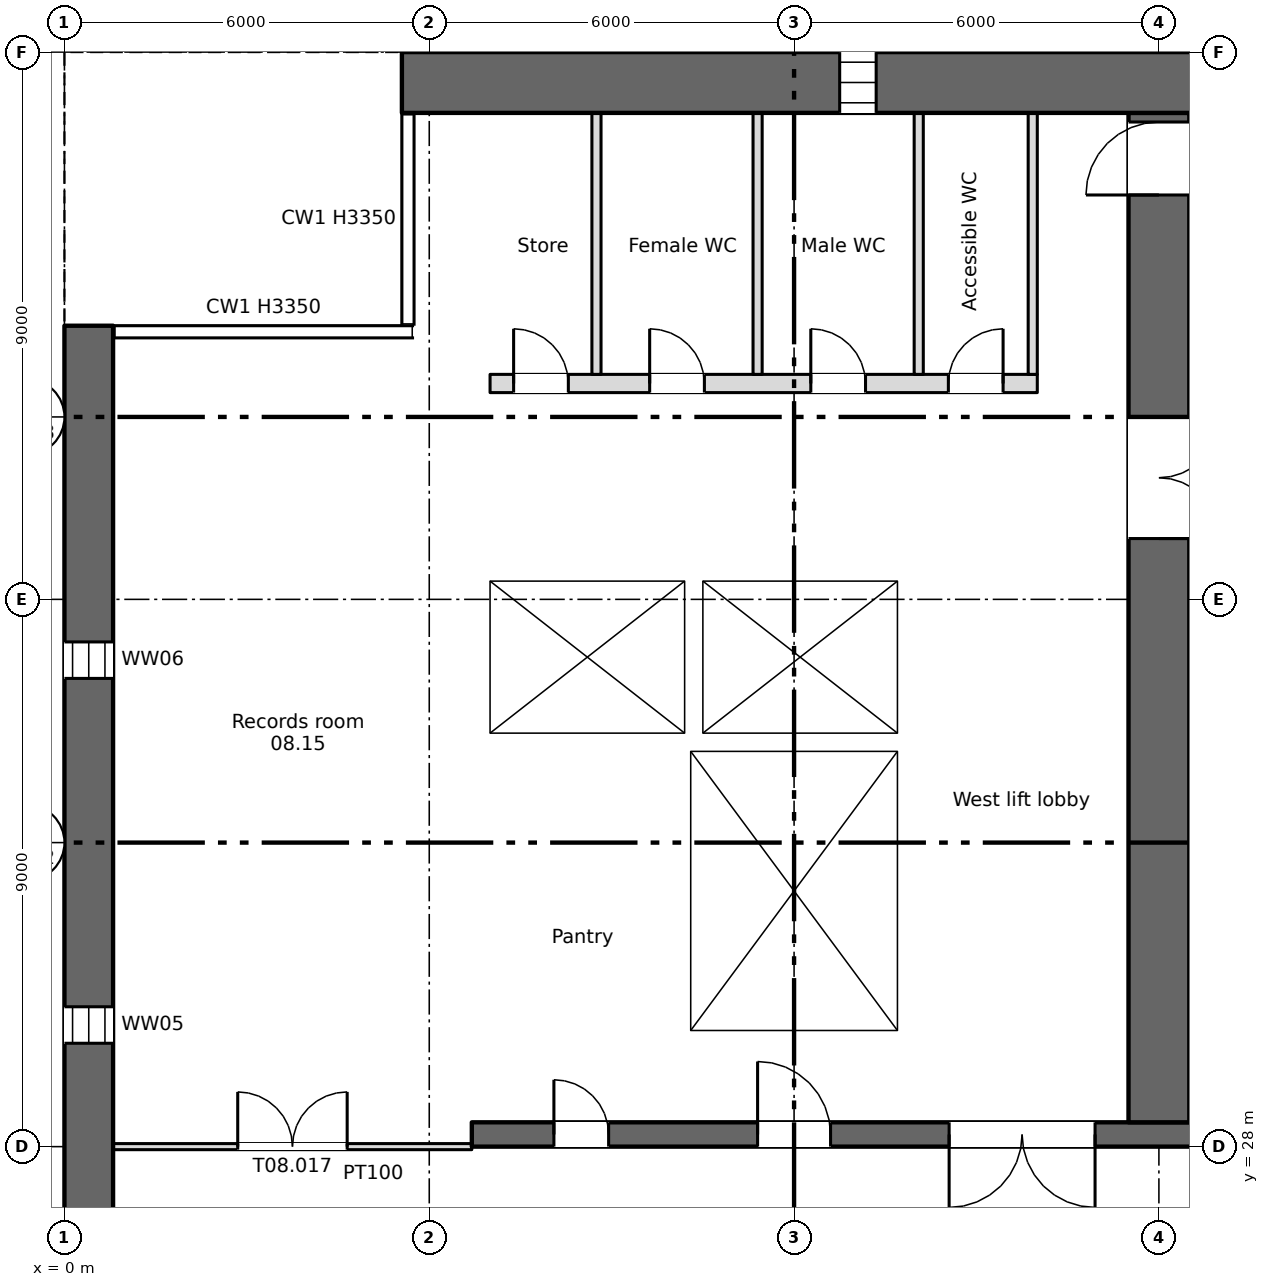
"""IFC4 building model, lengths in metres.
Left out: names, types, materials, properties, quantities, classifications, styles, units other than length and angle.
Written with IfcOpenShell. Run it as: python <this file> out.ifc"""

import sys

from ifc_helpers import new_model, si_unit, direction, frame, frame_2d, origin, place, context, subcontext, project, spatial, rectangle, extrude, element, fill, save


model = new_model("IFC4")
c1 = context("Model", 3, precision=1e-05, world=origin(), true_north=direction((0.0, 1.0)))
c2 = subcontext(c1, "Body", "Model", "MODEL_VIEW")
j1 = project(units=[si_unit("LENGTHUNIT", "METRE"), si_unit("PLANEANGLEUNIT", "RADIAN")], contexts=[c1])
p1 = place(None, origin())
s1 = spatial("IfcSite", under=j1, at=p1, CompositionType="ELEMENT")
p2 = place(p1, origin())
s2 = spatial("IfcBuilding", under=s1, at=p2, CompositionType="ELEMENT")
p3 = place(p2, frame((0.0, 0.0, 30.0)))
s3 = spatial("IfcBuildingStorey", under=s2, at=p3, CompositionType="ELEMENT", Elevation=30.0)
p4 = place(p3, frame((0.4, 4.5, 0.0), z_axis=(0.0, 0.0, 1.0), x_axis=(0.0, 1.0, 0.0)))
e1 = element("IfcWall", 1, at=p4, inside=s3, PredefinedType="SHEAR", context=c2, shape_type="SweptSolid", body=[
    extrude(rectangle(XDim=37.0, YDim=0.8, at=frame_2d((18.5, 0.0))), origin(), (0.0, 0.0, 1.0), 3.35),
])
p5 = place(p4, frame((1.2, 0.0, 0.6)))
e2 = element("IfcOpeningElement", 2, at=p5, cuts=e1, PredefinedType="OPENING", context=c2, shape_type="SweptSolid", body=[
    extrude(rectangle(XDim=0.6, YDim=2.4, at=frame_2d((0.3, 1.2))), frame((0.0, 0.41, 0.0), z_axis=(0.0, -1.0, 0.0), x_axis=(1.0, 0.0, 0.0)), (0.0, 0.0, 1.0), 0.82),
])
p6 = place(p4, frame((7.2, 0.0, 0.6)))
e3 = element("IfcOpeningElement", 3, at=p6, cuts=e1, PredefinedType="OPENING", context=c2, shape_type="SweptSolid", body=[
    extrude(rectangle(XDim=0.6, YDim=2.4, at=frame_2d((0.3, 1.2))), frame((0.0, 0.41, 0.0), z_axis=(0.0, -1.0, 0.0), x_axis=(1.0, 0.0, 0.0)), (0.0, 0.0, 1.0), 0.82),
])
p7 = place(p4, frame((13.2, 0.0, 0.6)))
e4 = element("IfcOpeningElement", 4, at=p7, cuts=e1, PredefinedType="OPENING", context=c2, shape_type="SweptSolid", body=[
    extrude(rectangle(XDim=0.6, YDim=2.4, at=frame_2d((0.3, 1.2))), frame((0.0, 0.41, 0.0), z_axis=(0.0, -1.0, 0.0), x_axis=(1.0, 0.0, 0.0)), (0.0, 0.0, 1.0), 0.82),
])
p8 = place(p4, frame((19.2, 0.0, 0.6)))
e5 = element("IfcOpeningElement", 5, at=p8, cuts=e1, PredefinedType="OPENING", context=c2, shape_type="SweptSolid", body=[
    extrude(rectangle(XDim=0.6, YDim=2.4, at=frame_2d((0.3, 1.2))), frame((0.0, 0.41, 0.0), z_axis=(0.0, -1.0, 0.0), x_axis=(1.0, 0.0, 0.0)), (0.0, 0.0, 1.0), 0.82),
])
p9 = place(p4, frame((25.2, 0.0, 0.6)))
e6 = element("IfcOpeningElement", 6, at=p9, cuts=e1, PredefinedType="OPENING", context=c2, shape_type="SweptSolid", body=[
    extrude(rectangle(XDim=0.6, YDim=2.4, at=frame_2d((0.3, 1.2))), frame((0.0, 0.41, 0.0), z_axis=(0.0, -1.0, 0.0), x_axis=(1.0, 0.0, 0.0)), (0.0, 0.0, 1.0), 0.82),
])
p10 = place(p4, frame((31.2, 0.0, 0.6)))
e7 = element("IfcOpeningElement", 7, at=p10, cuts=e1, PredefinedType="OPENING", context=c2, shape_type="SweptSolid", body=[
    extrude(rectangle(XDim=0.6, YDim=2.4, at=frame_2d((0.3, 1.2))), frame((0.0, 0.41, 0.0), z_axis=(0.0, -1.0, 0.0), x_axis=(1.0, 0.0, 0.0)), (0.0, 0.0, 1.0), 0.82),
])
p11 = place(p3, frame((5.55, 45.5, 0.0), z_axis=(0.0, 0.0, 1.0), x_axis=(1.0, 0.0, 0.0)))
e8 = element("IfcWall", 8, at=p11, inside=s3, PredefinedType="SHEAR", context=c2, shape_type="SweptSolid", body=[
    extrude(rectangle(XDim=66.9, YDim=1.0, at=frame_2d((33.45, 0.0))), origin(), (0.0, 0.0, 1.0), 3.35),
])
p12 = place(p11, frame((7.2, 0.0, 0.6)))
e9 = element("IfcOpeningElement", 9, at=p12, cuts=e8, PredefinedType="OPENING", context=c2, shape_type="SweptSolid", body=[
    extrude(rectangle(XDim=0.6, YDim=2.4, at=frame_2d((0.3, 1.2))), frame((0.0, 0.51, 0.0), z_axis=(0.0, -1.0, 0.0), x_axis=(1.0, 0.0, 0.0)), (0.0, 0.0, 1.0), 1.02),
])
p13 = place(p11, frame((61.2, 0.0, 0.6)))
e10 = element("IfcOpeningElement", 10, at=p13, cuts=e8, PredefinedType="OPENING", context=c2, shape_type="SweptSolid", body=[
    extrude(rectangle(XDim=0.6, YDim=2.4, at=frame_2d((0.3, 1.2))), frame((0.0, 0.51, 0.0), z_axis=(0.0, -1.0, 0.0), x_axis=(1.0, 0.0, 0.0)), (0.0, 0.0, 1.0), 1.02),
])
p14 = place(p3, frame((6.7, 28.2, 0.0), z_axis=(0.0, 0.0, 1.0), x_axis=(1.0, 0.0, 0.0)))
e11 = element("IfcWall", 11, at=p14, inside=s3, PredefinedType="SHEAR", context=c2, shape_type="SweptSolid", body=[
    extrude(rectangle(XDim=57.8, YDim=0.4, at=frame_2d((28.9, 0.0))), origin(), (0.0, 0.0, 1.0), 3.35),
])
p15 = place(p14, frame((12.062, 0.0, 0.0)))
e12 = element("IfcOpeningElement", 12, at=p15, cuts=e11, PredefinedType="OPENING", context=c2, shape_type="SweptSolid", body=[
    extrude(rectangle(XDim=0.9, YDim=2.1, at=frame_2d((0.45, 1.05))), frame((0.0, 0.21, 0.0), z_axis=(0.0, -1.0, 0.0), x_axis=(1.0, 0.0, 0.0)), (0.0, 0.0, 1.0), 0.42),
])
p16 = place(p14, frame((14.637, 0.0, 0.0)))
e13 = element("IfcOpeningElement", 13, at=p16, cuts=e11, PredefinedType="OPENING", context=c2, shape_type="SweptSolid", body=[
    extrude(rectangle(XDim=0.9, YDim=2.1, at=frame_2d((0.45, 1.05))), frame((0.0, 0.21, 0.0), z_axis=(0.0, -1.0, 0.0), x_axis=(1.0, 0.0, 0.0)), (0.0, 0.0, 1.0), 0.42),
])
p17 = place(p14, frame((49.062, 0.0, 0.0)))
e14 = element("IfcOpeningElement", 14, at=p17, cuts=e11, PredefinedType="OPENING", context=c2, shape_type="SweptSolid", body=[
    extrude(rectangle(XDim=0.9, YDim=2.1, at=frame_2d((0.45, 1.05))), frame((0.0, 0.21, 0.0), z_axis=(0.0, -1.0, 0.0), x_axis=(1.0, 0.0, 0.0)), (0.0, 0.0, 1.0), 0.42),
])
p18 = place(p14, frame((51.637, 0.0, 0.0)))
e15 = element("IfcOpeningElement", 15, at=p18, cuts=e11, PredefinedType="OPENING", context=c2, shape_type="SweptSolid", body=[
    extrude(rectangle(XDim=0.9, YDim=2.1, at=frame_2d((0.45, 1.05))), frame((0.0, 0.21, 0.0), z_axis=(0.0, -1.0, 0.0), x_axis=(1.0, 0.0, 0.0)), (0.0, 0.0, 1.0), 0.42),
])
p19 = place(p14, frame((1.35, 0.0, 0.0)))
e16 = element("IfcOpeningElement", 16, at=p19, cuts=e11, PredefinedType="OPENING", context=c2, shape_type="SweptSolid", body=[
    extrude(rectangle(XDim=0.9, YDim=2.1, at=frame_2d((0.45, 1.05))), frame((0.0, 0.21, 0.0), z_axis=(0.0, -1.0, 0.0), x_axis=(1.0, 0.0, 0.0)), (0.0, 0.0, 1.0), 0.42),
])
p20 = place(p14, frame((4.7, 0.0, 0.0)))
e17 = element("IfcOpeningElement", 17, at=p20, cuts=e11, PredefinedType="OPENING", context=c2, shape_type="SweptSolid", body=[
    extrude(rectangle(XDim=1.2, YDim=2.1, at=frame_2d((0.6, 1.05))), frame((0.0, 0.21, 0.0), z_axis=(0.0, -1.0, 0.0), x_axis=(1.0, 0.0, 0.0)), (0.0, 0.0, 1.0), 0.42),
])
p21 = place(p14, frame((31.7, 0.0, 0.0)))
e18 = element("IfcOpeningElement", 18, at=p21, cuts=e11, PredefinedType="OPENING", context=c2, shape_type="SweptSolid", body=[
    extrude(rectangle(XDim=1.2, YDim=2.1, at=frame_2d((0.6, 1.05))), frame((0.0, 0.21, 0.0), z_axis=(0.0, -1.0, 0.0), x_axis=(1.0, 0.0, 0.0)), (0.0, 0.0, 1.0), 0.42),
])
p22 = place(p14, frame((55.2, 0.0, 0.0)))
e19 = element("IfcOpeningElement", 19, at=p22, cuts=e11, PredefinedType="OPENING", context=c2, shape_type="SweptSolid", body=[
    extrude(rectangle(XDim=1.2, YDim=2.1, at=frame_2d((0.6, 1.05))), frame((0.0, 0.21, 0.0), z_axis=(0.0, -1.0, 0.0), x_axis=(1.0, 0.0, 0.0)), (0.0, 0.0, 1.0), 0.42),
])
p23 = place(p14, frame((21.7, 0.0, 0.0)))
e20 = element("IfcOpeningElement", 20, at=p23, cuts=e11, PredefinedType="OPENING", context=c2, shape_type="SweptSolid", body=[
    extrude(rectangle(XDim=1.2, YDim=2.1, at=frame_2d((0.6, 1.05))), frame((0.0, 0.21, 0.0), z_axis=(0.0, -1.0, 0.0), x_axis=(1.0, 0.0, 0.0)), (0.0, 0.0, 1.0), 0.42),
])
p24 = place(p14, frame((41.7, 0.0, 0.0)))
e21 = element("IfcOpeningElement", 21, at=p24, cuts=e11, PredefinedType="OPENING", context=c2, shape_type="SweptSolid", body=[
    extrude(rectangle(XDim=1.2, YDim=2.1, at=frame_2d((0.6, 1.05))), frame((0.0, 0.21, 0.0), z_axis=(0.0, -1.0, 0.0), x_axis=(1.0, 0.0, 0.0)), (0.0, 0.0, 1.0), 0.42),
])
p25 = place(p14, frame((24.85, 0.0, 0.0)))
e22 = element("IfcOpeningElement", 22, at=p25, cuts=e11, PredefinedType="OPENING", context=c2, shape_type="SweptSolid", body=[
    extrude(rectangle(XDim=2.4, YDim=2.1, at=frame_2d((1.2, 1.05))), frame((0.0, 0.21, 0.0), z_axis=(0.0, -1.0, 0.0), x_axis=(1.0, 0.0, 0.0)), (0.0, 0.0, 1.0), 0.42),
])
p26 = place(p14, frame((37.35, 0.0, 0.0)))
e23 = element("IfcOpeningElement", 23, at=p26, cuts=e11, PredefinedType="OPENING", context=c2, shape_type="SweptSolid", body=[
    extrude(rectangle(XDim=2.4, YDim=2.1, at=frame_2d((1.2, 1.05))), frame((0.0, 0.21, 0.0), z_axis=(0.0, -1.0, 0.0), x_axis=(1.0, 0.0, 0.0)), (0.0, 0.0, 1.0), 0.42),
])
p27 = place(p14, frame((7.85, 0.0, 0.0)))
e24 = element("IfcOpeningElement", 24, at=p27, cuts=e11, PredefinedType="OPENING", context=c2, shape_type="SweptSolid", body=[
    extrude(rectangle(XDim=2.4, YDim=2.1, at=frame_2d((1.2, 1.05))), frame((0.0, 0.21, 0.0), z_axis=(0.0, -1.0, 0.0), x_axis=(1.0, 0.0, 0.0)), (0.0, 0.0, 1.0), 0.42),
])
p28 = place(p14, frame((28.85, 0.0, 0.0)))
e25 = element("IfcOpeningElement", 25, at=p28, cuts=e11, PredefinedType="OPENING", context=c2, shape_type="SweptSolid", body=[
    extrude(rectangle(XDim=0.9, YDim=2.1, at=frame_2d((0.45, 1.05))), frame((0.0, 0.21, 0.0), z_axis=(0.0, -1.0, 0.0), x_axis=(1.0, 0.0, 0.0)), (0.0, 0.0, 1.0), 0.42),
])
p29 = place(p14, frame((34.85, 0.0, 0.0)))
e26 = element("IfcOpeningElement", 26, at=p29, cuts=e11, PredefinedType="OPENING", context=c2, shape_type="SweptSolid", body=[
    extrude(rectangle(XDim=0.9, YDim=2.1, at=frame_2d((0.45, 1.05))), frame((0.0, 0.21, 0.0), z_axis=(0.0, -1.0, 0.0), x_axis=(1.0, 0.0, 0.0)), (0.0, 0.0, 1.0), 0.42),
])
p30 = place(p3, frame((6.85, 28.4, 0.0), z_axis=(0.0, 0.0, 1.0), x_axis=(0.0, 1.0, 0.0)))
e27 = element("IfcWall", 27, at=p30, inside=s3, PredefinedType="SHEAR", context=c2, shape_type="SweptSolid", body=[
    extrude(rectangle(XDim=16.6, YDim=0.3, at=frame_2d((8.3, 0.0))), origin(), (0.0, 0.0, 1.0), 3.35),
])
p31 = place(p3, frame((18.0, 28.4, 0.0), z_axis=(0.0, 0.0, 1.0), x_axis=(0.0, 1.0, 0.0)))
e28 = element("IfcWall", 28, at=p31, inside=s3, PredefinedType="SHEAR", context=c2, shape_type="SweptSolid", body=[
    extrude(rectangle(XDim=16.6, YDim=1.0, at=frame_2d((8.3, 0.0))), origin(), (0.0, 0.0, 1.0), 3.35),
])
p32 = place(p31, frame((9.6, 0.0, 0.0)))
e29 = element("IfcOpeningElement", 29, at=p32, cuts=e28, PredefinedType="OPENING", context=c2, shape_type="SweptSolid", body=[
    extrude(rectangle(XDim=2.0, YDim=2.1, at=frame_2d((1.0, 1.05))), frame((0.0, 0.51, 0.0), z_axis=(0.0, -1.0, 0.0), x_axis=(1.0, 0.0, 0.0)), (0.0, 0.0, 1.0), 1.02),
])
p33 = place(p31, frame((15.25, 0.0, 0.0)))
e30 = element("IfcOpeningElement", 30, at=p33, cuts=e28, PredefinedType="OPENING", context=c2, shape_type="SweptSolid", body=[
    extrude(rectangle(XDim=1.2, YDim=2.1, at=frame_2d((0.6, 1.05))), frame((0.0, 0.51, 0.0), z_axis=(0.0, -1.0, 0.0), x_axis=(1.0, 0.0, 0.0)), (0.0, 0.0, 1.0), 1.02),
])
for number, where, z_axis, x_axis in (
    (31, (10.15, 28.4, 0.0), (0.0, 0.0, 1.0), (0.0, 1.0, 0.0)),
    (32, (13.85, 28.4, 0.0), (0.0, 0.0, 1.0), (0.0, 1.0, 0.0)),
):
    element("IfcWall", number, at=place(p3, frame(where, z_axis=z_axis, x_axis=x_axis)), inside=s3, PredefinedType="SHEAR", context=c2, shape_type="SweptSolid", body=[
        extrude(rectangle(XDim=6.1, YDim=0.3, at=frame_2d((3.05, 0.0))), origin(), (0.0, 0.0, 1.0), 3.35),
    ])
for number, where, z_axis, x_axis in (
    (33, (7.0, 34.65, 0.0), (0.0, 0.0, 1.0), (1.0, 0.0, 0.0)),
    (34, (7.0, 37.45, 0.0), (0.0, 0.0, 1.0), (1.0, 0.0, 0.0)),
):
    element("IfcWall", number, at=place(p3, frame(where, z_axis=z_axis, x_axis=x_axis)), inside=s3, PredefinedType="SHEAR", context=c2, shape_type="SweptSolid", body=[
        extrude(rectangle(XDim=7.0, YDim=0.3, at=frame_2d((3.5, 0.0))), origin(), (0.0, 0.0, 1.0), 3.35),
    ])
p34 = place(p3, frame((13.85, 34.8, 0.0), z_axis=(0.0, 0.0, 1.0), x_axis=(0.0, 1.0, 0.0)))
e35 = element("IfcWall", 35, at=p34, inside=s3, PredefinedType="SHEAR", context=c2, shape_type="SweptSolid", body=[
    extrude(rectangle(XDim=2.5, YDim=0.3, at=frame_2d((1.25, 0.0))), origin(), (0.0, 0.0, 1.0), 3.35),
])
p35 = place(p3, frame((7.0, 40.55, 0.0), z_axis=(0.0, 0.0, 1.0), x_axis=(1.0, 0.0, 0.0)))
e36 = element("IfcWall", 36, at=p35, inside=s3, PredefinedType="PARTITIONING", context=c2, shape_type="SweptSolid", body=[
    extrude(rectangle(XDim=9.0, YDim=0.3, at=frame_2d((4.5, 0.0))), origin(), (0.0, 0.0, 1.0), 3.35),
])
p36 = place(p35, frame((0.387, 0.0, 0.0)))
e37 = element("IfcOpeningElement", 37, at=p36, cuts=e36, PredefinedType="OPENING", context=c2, shape_type="SweptSolid", body=[
    extrude(rectangle(XDim=0.9, YDim=2.1, at=frame_2d((0.45, 1.05))), frame((0.0, 0.16, 0.0), z_axis=(0.0, -1.0, 0.0), x_axis=(1.0, 0.0, 0.0)), (0.0, 0.0, 1.0), 0.32),
])
p37 = place(p35, frame((2.625, 0.0, 0.0)))
e38 = element("IfcOpeningElement", 38, at=p37, cuts=e36, PredefinedType="OPENING", context=c2, shape_type="SweptSolid", body=[
    extrude(rectangle(XDim=0.9, YDim=2.1, at=frame_2d((0.45, 1.05))), frame((0.0, 0.16, 0.0), z_axis=(0.0, -1.0, 0.0), x_axis=(1.0, 0.0, 0.0)), (0.0, 0.0, 1.0), 0.32),
])
p38 = place(p35, frame((5.275, 0.0, 0.0)))
e39 = element("IfcOpeningElement", 39, at=p38, cuts=e36, PredefinedType="OPENING", context=c2, shape_type="SweptSolid", body=[
    extrude(rectangle(XDim=0.9, YDim=2.1, at=frame_2d((0.45, 1.05))), frame((0.0, 0.16, 0.0), z_axis=(0.0, -1.0, 0.0), x_axis=(1.0, 0.0, 0.0)), (0.0, 0.0, 1.0), 0.32),
])
p39 = place(p35, frame((7.538, 0.0, 0.0)))
e40 = element("IfcOpeningElement", 40, at=p39, cuts=e36, PredefinedType="OPENING", context=c2, shape_type="SweptSolid", body=[
    extrude(rectangle(XDim=0.9, YDim=2.1, at=frame_2d((0.45, 1.05))), frame((0.0, 0.16, 0.0), z_axis=(0.0, -1.0, 0.0), x_axis=(1.0, 0.0, 0.0)), (0.0, 0.0, 1.0), 0.32),
])
p40 = place(p3, frame((10.35, 34.8, 0.0), z_axis=(0.0, 0.0, 1.0), x_axis=(0.0, 1.0, 0.0)))
e41 = element("IfcWall", 41, at=p40, inside=s3, PredefinedType="SHEAR", context=c2, shape_type="SweptSolid", body=[
    extrude(rectangle(XDim=2.5, YDim=0.3, at=frame_2d((1.25, 0.0))), origin(), (0.0, 0.0, 1.0), 3.35),
])
for number, where, z_axis, x_axis in (
    (42, (15.925, 40.7, 0.0), (0.0, 0.0, 1.0), (0.0, 1.0, 0.0)),
    (43, (8.75, 40.7, 0.0), (0.0, 0.0, 1.0), (0.0, 1.0, 0.0)),
    (44, (11.4, 40.7, 0.0), (0.0, 0.0, 1.0), (0.0, 1.0, 0.0)),
    (45, (14.05, 40.7, 0.0), (0.0, 0.0, 1.0), (0.0, 1.0, 0.0)),
):
    element("IfcWall", number, at=place(p3, frame(where, z_axis=z_axis, x_axis=x_axis)), inside=s3, PredefinedType="PARTITIONING", context=c2, shape_type="SweptSolid", body=[
        extrude(rectangle(XDim=4.3, YDim=0.15, at=frame_2d((2.15, 0.0))), origin(), (0.0, 0.0, 1.0), 3.35),
    ])
p41 = place(p3, frame((0.8, 28.0, 0.0), z_axis=(0.0, 0.0, 1.0), x_axis=(1.0, 0.0, 0.0)))
e46 = element("IfcWall", 46, at=p41, inside=s3, PredefinedType="PARTITIONING", context=c2, shape_type="SweptSolid", body=[
    extrude(rectangle(XDim=5.9, YDim=0.1, at=frame_2d((2.95, 0.0))), origin(), (0.0, 0.0, 1.0), 3.35),
])
p42 = place(p41, frame((2.05, 0.0, 0.0)))
e47 = element("IfcOpeningElement", 47, at=p42, cuts=e46, PredefinedType="OPENING", context=c2, shape_type="SweptSolid", body=[
    extrude(rectangle(XDim=1.8, YDim=2.1, at=frame_2d((0.9, 1.05))), frame((0.0, 0.06, 0.0), z_axis=(0.0, -1.0, 0.0), x_axis=(1.0, 0.0, 0.0)), (0.0, 0.0, 1.0), 0.12),
])
p43 = place(p12, origin())
e48 = element("IfcWindow", 48, at=p43, inside=s3, PartitioningType="SINGLE_PANEL", PredefinedType="WINDOW", context=c2, shape_type="SweptSolid", body=[
    extrude(rectangle(XDim=0.6, YDim=2.4, at=frame_2d((0.3, 1.2))), frame((0.0, 0.03, 0.0), z_axis=(0.0, -1.0, 0.0), x_axis=(1.0, 0.0, 0.0)), (0.0, 0.0, 1.0), 0.06),
])
fill(e9, e48)
p44 = place(p9, origin())
e49 = element("IfcWindow", 49, at=p44, inside=s3, PartitioningType="SINGLE_PANEL", PredefinedType="WINDOW", context=c2, shape_type="SweptSolid", body=[
    extrude(rectangle(XDim=0.6, YDim=2.4, at=frame_2d((0.3, 1.2))), frame((0.0, 0.03, 0.0), z_axis=(0.0, -1.0, 0.0), x_axis=(1.0, 0.0, 0.0)), (0.0, 0.0, 1.0), 0.06),
])
fill(e6, e49)
p45 = place(p10, origin())
e50 = element("IfcWindow", 50, at=p45, inside=s3, PartitioningType="SINGLE_PANEL", PredefinedType="WINDOW", context=c2, shape_type="SweptSolid", body=[
    extrude(rectangle(XDim=0.6, YDim=2.4, at=frame_2d((0.3, 1.2))), frame((0.0, 0.03, 0.0), z_axis=(0.0, -1.0, 0.0), x_axis=(1.0, 0.0, 0.0)), (0.0, 0.0, 1.0), 0.06),
])
fill(e7, e50)
p46 = place(p19, origin())
e51 = element("IfcDoor", 51, at=p46, inside=s3, OperationType="SINGLE_SWING_LEFT", PredefinedType="DOOR", context=c2, shape_type="SweptSolid", body=[
    extrude(rectangle(XDim=0.9, YDim=2.1, at=frame_2d((0.45, 1.05))), frame((0.0, 0.025, 0.0), z_axis=(0.0, -1.0, 0.0), x_axis=(1.0, 0.0, 0.0)), (0.0, 0.0, 1.0), 0.05),
])
fill(e16, e51)
p47 = place(p36, origin())
e52 = element("IfcDoor", 52, at=p47, inside=s3, OperationType="SINGLE_SWING_LEFT", PredefinedType="DOOR", context=c2, shape_type="SweptSolid", body=[
    extrude(rectangle(XDim=0.9, YDim=2.1, at=frame_2d((0.45, 1.05))), frame((0.0, 0.025, 0.0), z_axis=(0.0, -1.0, 0.0), x_axis=(1.0, 0.0, 0.0)), (0.0, 0.0, 1.0), 0.05),
])
fill(e37, e52)
p48 = place(p37, origin())
e53 = element("IfcDoor", 53, at=p48, inside=s3, OperationType="SINGLE_SWING_LEFT", PredefinedType="DOOR", context=c2, shape_type="SweptSolid", body=[
    extrude(rectangle(XDim=0.9, YDim=2.1, at=frame_2d((0.45, 1.05))), frame((0.0, 0.025, 0.0), z_axis=(0.0, -1.0, 0.0), x_axis=(1.0, 0.0, 0.0)), (0.0, 0.0, 1.0), 0.05),
])
fill(e38, e53)
p49 = place(p38, origin())
e54 = element("IfcDoor", 54, at=p49, inside=s3, OperationType="SINGLE_SWING_LEFT", PredefinedType="DOOR", context=c2, shape_type="SweptSolid", body=[
    extrude(rectangle(XDim=0.9, YDim=2.1, at=frame_2d((0.45, 1.05))), frame((0.0, 0.025, 0.0), z_axis=(0.0, -1.0, 0.0), x_axis=(1.0, 0.0, 0.0)), (0.0, 0.0, 1.0), 0.05),
])
fill(e39, e54)
p50 = place(p39, origin())
e55 = element("IfcDoor", 55, at=p50, inside=s3, OperationType="SINGLE_SWING_RIGHT", PredefinedType="DOOR", context=c2, shape_type="SweptSolid", body=[
    extrude(rectangle(XDim=0.9, YDim=2.1, at=frame_2d((0.45, 1.05))), frame((0.0, 0.025, 0.0), z_axis=(0.0, -1.0, 0.0), x_axis=(1.0, 0.0, 0.0)), (0.0, 0.0, 1.0), 0.05),
])
fill(e40, e55)
p51 = place(p20, origin())
e56 = element("IfcDoor", 56, at=p51, inside=s3, OperationType="SINGLE_SWING_LEFT", PredefinedType="DOOR", context=c2, shape_type="SweptSolid", body=[
    extrude(rectangle(XDim=1.2, YDim=2.1, at=frame_2d((0.6, 1.05))), frame((0.0, 0.025, 0.0), z_axis=(0.0, -1.0, 0.0), x_axis=(1.0, 0.0, 0.0)), (0.0, 0.0, 1.0), 0.05),
])
fill(e17, e56)
p52 = place(p27, origin())
e57 = element("IfcDoor", 57, at=p52, inside=s3, OperationType="DOUBLE_DOOR_SINGLE_SWING", PredefinedType="DOOR", context=c2, shape_type="SweptSolid", body=[
    extrude(rectangle(XDim=2.4, YDim=2.1, at=frame_2d((1.2, 1.05))), frame((0.0, 0.025, 0.0), z_axis=(0.0, -1.0, 0.0), x_axis=(1.0, 0.0, 0.0)), (0.0, 0.0, 1.0), 0.05),
])
fill(e24, e57)
p53 = place(p32, origin())
e58 = element("IfcDoor", 58, at=p53, inside=s3, OperationType="DOUBLE_DOOR_SINGLE_SWING", PredefinedType="DOOR", context=c2, shape_type="SweptSolid", body=[
    extrude(rectangle(XDim=2.0, YDim=2.1, at=frame_2d((1.0, 1.05))), frame((0.0, 0.025, 0.0), z_axis=(0.0, -1.0, 0.0), x_axis=(1.0, 0.0, 0.0)), (0.0, 0.0, 1.0), 0.05),
])
fill(e29, e58)
p54 = place(p33, origin())
e59 = element("IfcDoor", 59, at=p54, inside=s3, OperationType="SINGLE_SWING_LEFT", PredefinedType="DOOR", context=c2, shape_type="SweptSolid", body=[
    extrude(rectangle(XDim=1.2, YDim=2.1, at=frame_2d((0.6, 1.05))), frame((0.0, 0.025, 0.0), z_axis=(0.0, -1.0, 0.0), x_axis=(1.0, 0.0, 0.0)), (0.0, 0.0, 1.0), 0.05),
])
fill(e30, e59)
p55 = place(p42, origin())
e60 = element("IfcDoor", 60, at=p55, inside=s3, OperationType="DOUBLE_DOOR_SINGLE_SWING", PredefinedType="DOOR", context=c2, shape_type="SweptSolid", body=[
    extrude(rectangle(XDim=1.8, YDim=2.1, at=frame_2d((0.9, 1.05))), frame((0.0, 0.025, 0.0), z_axis=(0.0, -1.0, 0.0), x_axis=(1.0, 0.0, 0.0)), (0.0, 0.0, 1.0), 0.05),
])
fill(e47, e60)
save(model, sys.argv[1])
